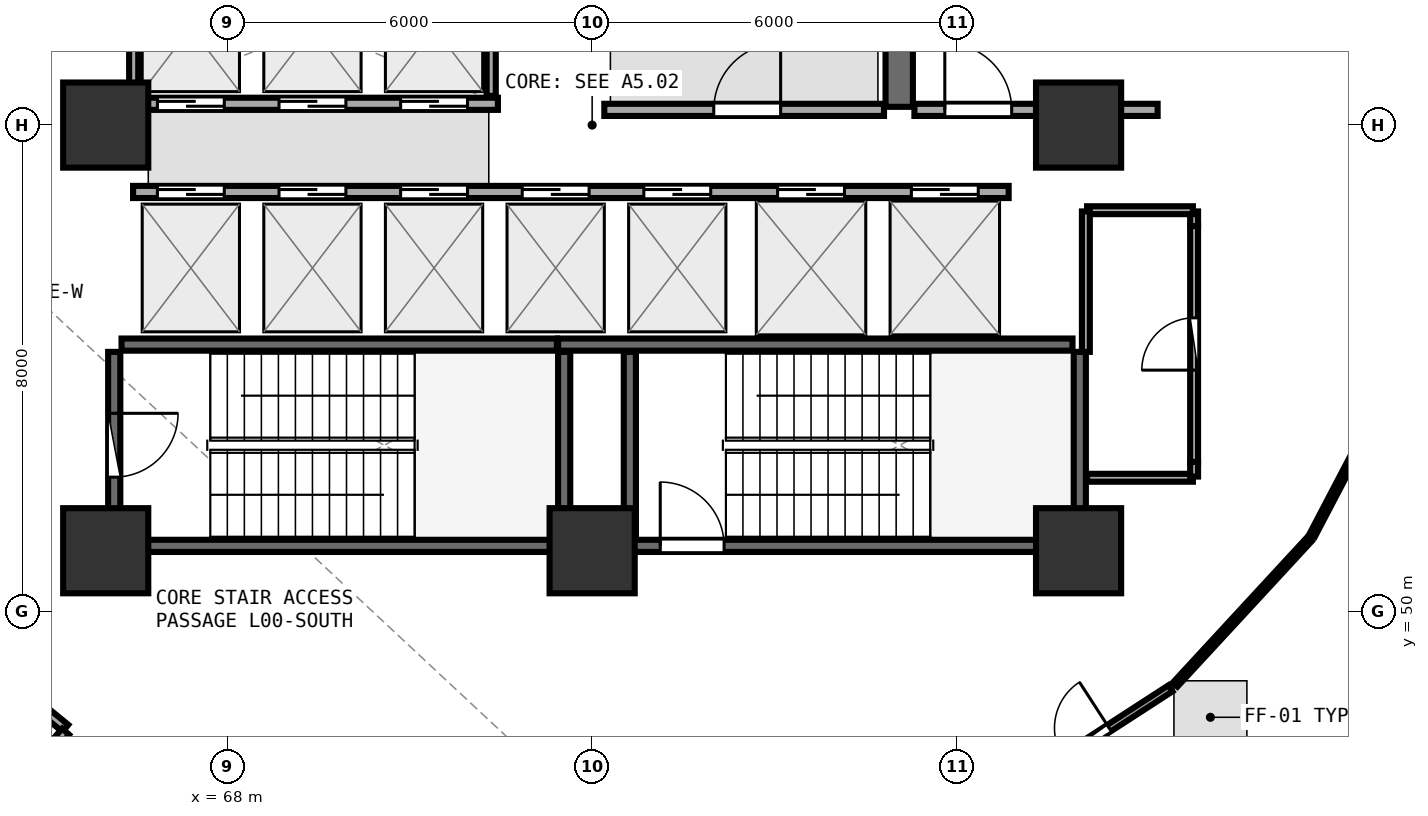
"""IFC4 building model, lengths in metres.
Left out: names, types, materials, properties, quantities, classifications, styles, units other than length and angle.
Written with IfcOpenShell. Run it as: python <this file> out.ifc"""

import sys

from ifc_helpers import new_model, si_unit, direction, frame, frame_2d, origin, origin_2d, place, context, subcontext, project, spatial, rectangle, extrude, element, fill, save


model = new_model("IFC4")
c1 = context("Model", 3, precision=1e-05, world=origin(), true_north=direction((0.0, 1.0)))
c2 = subcontext(c1, "Body", "Model", "MODEL_VIEW")
j1 = project(units=[si_unit("LENGTHUNIT", "METRE"), si_unit("PLANEANGLEUNIT", "RADIAN")], contexts=[c1])
p1 = place(None, origin())
s1 = spatial("IfcSite", under=j1, at=p1, CompositionType="ELEMENT")
p2 = place(p1, origin())
s2 = spatial("IfcBuilding", under=s1, at=p2, CompositionType="ELEMENT")
p3 = place(p2, origin())
s3 = spatial("IfcBuildingStorey", under=s2, at=p3, CompositionType="ELEMENT", Elevation=0.0)
for number, where, z_axis, x_axis in (
    (1, (66.0, 51.0, 0.0), (0.0, 0.0, 1.0), (1.0, 0.0, 0.0)),
    (2, (74.0, 51.0, 0.0), (0.0, 0.0, 1.0), (1.0, 0.0, 0.0)),
    (3, (82.0, 51.0, 0.0), (0.0, 0.0, 1.0), (1.0, 0.0, 0.0)),
    (4, (82.0, 58.0, 0.0), (0.0, 0.0, 1.0), (1.0, 0.0, 0.0)),
    (5, (66.0, 58.0, 0.0), (0.0, 0.0, 1.0), (1.0, 0.0, 0.0)),
):
    element("IfcColumn", number, at=place(p3, frame(where, z_axis=z_axis, x_axis=x_axis)), inside=s3, PredefinedType="PILASTER", context=c2, shape_type="SweptSolid", body=[
        extrude(rectangle(XDim=1.4, YDim=1.4, at=origin_2d()), origin(), (0.0, 0.0, 1.0), 4.5),
    ])
p4 = place(p3, frame((74.0, 51.08, 0.0), z_axis=(0.0, 0.0, 1.0), x_axis=(1.0, 0.0, 0.0)))
e6 = element("IfcWall", 6, at=p4, inside=s3, PredefinedType="SHEAR", context=c2, shape_type="SweptSolid", body=[
    extrude(rectangle(XDim=7.9, YDim=0.2, at=frame_2d((3.95, 0.0))), origin(), (0.0, 0.0, 1.0), 4.2),
])
p5 = place(p4, frame((1.12, 0.0, 0.0)))
e7 = element("IfcOpeningElement", 7, at=p5, cuts=e6, PredefinedType="OPENING", context=c2, shape_type="SweptSolid", body=[
    extrude(rectangle(XDim=1.05, YDim=2.1, at=frame_2d((0.525, 1.05))), frame((0.0, 0.11, 0.0), z_axis=(0.0, -1.0, 0.0), x_axis=(1.0, 0.0, 0.0)), (0.0, 0.0, 1.0), 0.22),
])
p6 = place(p3, frame((82.02, 51.2, 0.0), z_axis=(0.0, 0.0, 1.0), x_axis=(0.0, 1.0, 0.0)))
e8 = element("IfcWall", 8, at=p6, inside=s3, PredefinedType="SHEAR", context=c2, shape_type="SweptSolid", body=[
    extrude(rectangle(XDim=3.07, YDim=0.2, at=frame_2d((1.535, 0.0))), origin(), (0.0, 0.0, 1.0), 4.2),
])
p7 = place(p3, frame((81.9, 54.39, 0.0), z_axis=(0.0, 0.0, 1.0), x_axis=(-1.0, 0.0, 0.0)))
e9 = element("IfcWall", 9, at=p7, inside=s3, PredefinedType="SHEAR", context=c2, shape_type="SweptSolid", body=[
    extrude(rectangle(XDim=8.46, YDim=0.2, at=frame_2d((4.23, 0.0))), origin(), (0.0, 0.0, 1.0), 4.2),
])
p8 = place(p3, frame((74.62, 54.27, 0.0), z_axis=(0.0, 0.0, 1.0), x_axis=(0.0, -1.0, 0.0)))
e10 = element("IfcWall", 10, at=p8, inside=s3, PredefinedType="SHEAR", context=c2, shape_type="SweptSolid", body=[
    extrude(rectangle(XDim=3.07, YDim=0.2, at=frame_2d((1.535, 0.0))), origin(), (0.0, 0.0, 1.0), 4.2),
])
p9 = place(p3, frame((66.26, 51.08, 0.0), z_axis=(0.0, 0.0, 1.0), x_axis=(1.0, 0.0, 0.0)))
e11 = element("IfcWall", 11, at=p9, inside=s3, PredefinedType="SHEAR", context=c2, shape_type="SweptSolid", body=[
    extrude(rectangle(XDim=7.16, YDim=0.2, at=frame_2d((3.58, 0.0))), origin(), (0.0, 0.0, 1.0), 4.2),
])
p10 = place(p3, frame((73.54, 51.2, 0.0), z_axis=(0.0, 0.0, 1.0), x_axis=(0.0, 1.0, 0.0)))
e12 = element("IfcWall", 12, at=p10, inside=s3, PredefinedType="SHEAR", context=c2, shape_type="SweptSolid", body=[
    extrude(rectangle(XDim=3.07, YDim=0.2, at=frame_2d((1.535, 0.0))), origin(), (0.0, 0.0, 1.0), 4.2),
])
p11 = place(p3, frame((73.42, 54.39, 0.0), z_axis=(0.0, 0.0, 1.0), x_axis=(-1.0, 0.0, 0.0)))
e13 = element("IfcWall", 13, at=p11, inside=s3, PredefinedType="SHEAR", context=c2, shape_type="SweptSolid", body=[
    extrude(rectangle(XDim=7.16, YDim=0.2, at=frame_2d((3.58, 0.0))), origin(), (0.0, 0.0, 1.0), 4.2),
])
p12 = place(p3, frame((66.14, 54.27, 0.0), z_axis=(0.0, 0.0, 1.0), x_axis=(0.0, -1.0, 0.0)))
e14 = element("IfcWall", 14, at=p12, inside=s3, PredefinedType="SHEAR", context=c2, shape_type="SweptSolid", body=[
    extrude(rectangle(XDim=3.07, YDim=0.2, at=frame_2d((1.535, 0.0))), origin(), (0.0, 0.0, 1.0), 4.2),
])
p13 = place(p12, frame((1.01, 0.0, 0.0)))
e15 = element("IfcOpeningElement", 15, at=p13, cuts=e14, PredefinedType="OPENING", context=c2, shape_type="SweptSolid", body=[
    extrude(rectangle(XDim=1.05, YDim=2.1, at=frame_2d((0.525, 1.05))), frame((0.0, 0.11, 0.0), z_axis=(0.0, -1.0, 0.0), x_axis=(1.0, 0.0, 0.0)), (0.0, 0.0, 1.0), 0.22),
])
p14 = place(p3, frame((79.05, 58.3, 0.0), z_axis=(0.0, 0.0, 1.0), x_axis=(0.0, 1.0, 0.0)))
e16 = element("IfcWall", 16, at=p14, inside=s3, PredefinedType="SHEAR", context=c2, shape_type="SweptSolid", body=[
    extrude(rectangle(XDim=6.3, YDim=0.45, at=frame_2d((3.15, 0.0))), origin(), (0.0, 0.0, 1.0), 4.2),
])
p15 = place(p3, frame((74.2, 58.25, 0.0), z_axis=(0.0, 0.0, 1.0), x_axis=(1.0, 0.0, 0.0)))
e17 = element("IfcWall", 17, at=p15, inside=s3, PredefinedType="SOLIDWALL", context=c2, shape_type="SweptSolid", body=[
    extrude(rectangle(XDim=4.6, YDim=0.2, at=frame_2d((2.3, 0.0))), origin(), (0.0, 0.0, 1.0), 4.19),
])
p16 = place(p15, frame((1.8, 0.0, 0.0)))
e18 = element("IfcOpeningElement", 18, at=p16, cuts=e17, PredefinedType="OPENING", context=c2, shape_type="SweptSolid", body=[
    extrude(rectangle(XDim=1.1, YDim=2.1, at=frame_2d((0.55, 1.05))), frame((0.0, 0.11, 0.0), z_axis=(0.0, -1.0, 0.0), x_axis=(1.0, 0.0, 0.0)), (0.0, 0.0, 1.0), 0.22),
])
p17 = place(p3, frame((79.3, 58.25, 0.0), z_axis=(0.0, 0.0, 1.0), x_axis=(1.0, 0.0, 0.0)))
e19 = element("IfcWall", 19, at=p17, inside=s3, PredefinedType="SOLIDWALL", context=c2, shape_type="SweptSolid", body=[
    extrude(rectangle(XDim=4.0, YDim=0.2, at=frame_2d((2.0, 0.0))), origin(), (0.0, 0.0, 1.0), 3.485),
])
p18 = place(p17, frame((0.5, 0.0, 0.0)))
e20 = element("IfcOpeningElement", 20, at=p18, cuts=e19, PredefinedType="OPENING", context=c2, shape_type="SweptSolid", body=[
    extrude(rectangle(XDim=1.1, YDim=2.1, at=frame_2d((0.55, 1.05))), frame((0.0, 0.11, 0.0), z_axis=(0.0, -1.0, 0.0), x_axis=(1.0, 0.0, 0.0)), (0.0, 0.0, 1.0), 0.22),
])
p19 = place(p3, frame((66.45, 58.35, 0.0), z_axis=(0.0, 0.0, 1.0), x_axis=(1.0, 0.0, 0.0)))
e21 = element("IfcWall", 21, at=p19, inside=s3, PredefinedType="SOLIDWALL", context=c2, shape_type="SweptSolid", body=[
    extrude(rectangle(XDim=6.0, YDim=0.2, at=frame_2d((3.0, 0.0))), origin(), (0.0, 0.0, 1.0), 4.19),
])
p20 = place(p19, frame((0.4, 0.0, 0.0)))
e22 = element("IfcOpeningElement", 22, at=p20, cuts=e21, PredefinedType="OPENING", context=c2, shape_type="SweptSolid", body=[
    extrude(rectangle(XDim=1.1, YDim=2.1, at=frame_2d((0.55, 1.05))), frame((0.0, 0.11, 0.0), z_axis=(0.0, -1.0, 0.0), x_axis=(1.0, 0.0, 0.0)), (0.0, 0.0, 1.0), 0.22),
])
p21 = place(p19, frame((2.4, 0.0, 0.0)))
e23 = element("IfcOpeningElement", 23, at=p21, cuts=e21, PredefinedType="OPENING", context=c2, shape_type="SweptSolid", body=[
    extrude(rectangle(XDim=1.1, YDim=2.1, at=frame_2d((0.55, 1.05))), frame((0.0, 0.11, 0.0), z_axis=(0.0, -1.0, 0.0), x_axis=(1.0, 0.0, 0.0)), (0.0, 0.0, 1.0), 0.22),
])
p22 = place(p19, frame((4.4, 0.0, 0.0)))
e24 = element("IfcOpeningElement", 24, at=p22, cuts=e21, PredefinedType="OPENING", context=c2, shape_type="SweptSolid", body=[
    extrude(rectangle(XDim=1.1, YDim=2.1, at=frame_2d((0.55, 1.05))), frame((0.0, 0.11, 0.0), z_axis=(0.0, -1.0, 0.0), x_axis=(1.0, 0.0, 0.0)), (0.0, 0.0, 1.0), 0.22),
])
for number, where, z_axis, x_axis in (
    (25, (66.46, 58.48, 0.0), (0.0, 0.0, 1.0), (0.0, 1.0, 0.0)),
    (26, (72.34, 58.48, 0.0), (0.0, 0.0, 1.0), (0.0, 1.0, 0.0)),
):
    element("IfcWall", number, at=place(p3, frame(where, z_axis=z_axis, x_axis=x_axis)), inside=s3, PredefinedType="PARTITIONING", context=c2, shape_type="SweptSolid", body=[
        extrude(rectangle(XDim=2.46, YDim=0.15, at=frame_2d((1.23, 0.0))), origin(), (0.0, 0.0, 1.0), 4.19),
    ])
p23 = place(p3, frame((66.45, 56.9, 0.0), z_axis=(0.0, 0.0, 1.0), x_axis=(1.0, 0.0, 0.0)))
e27 = element("IfcWall", 27, at=p23, inside=s3, PredefinedType="SOLIDWALL", context=c2, shape_type="SweptSolid", body=[
    extrude(rectangle(XDim=14.4, YDim=0.2, at=frame_2d((7.2, 0.0))), origin(), (0.0, 0.0, 1.0), 4.19),
])
p24 = place(p23, frame((0.4, 0.0, 0.0)))
e28 = element("IfcOpeningElement", 28, at=p24, cuts=e27, PredefinedType="OPENING", context=c2, shape_type="SweptSolid", body=[
    extrude(rectangle(XDim=1.1, YDim=2.1, at=frame_2d((0.55, 1.05))), frame((0.0, 0.11, 0.0), z_axis=(0.0, -1.0, 0.0), x_axis=(1.0, 0.0, 0.0)), (0.0, 0.0, 1.0), 0.22),
])
p25 = place(p23, frame((2.4, 0.0, 0.0)))
e29 = element("IfcOpeningElement", 29, at=p25, cuts=e27, PredefinedType="OPENING", context=c2, shape_type="SweptSolid", body=[
    extrude(rectangle(XDim=1.1, YDim=2.1, at=frame_2d((0.55, 1.05))), frame((0.0, 0.11, 0.0), z_axis=(0.0, -1.0, 0.0), x_axis=(1.0, 0.0, 0.0)), (0.0, 0.0, 1.0), 0.22),
])
p26 = place(p23, frame((4.4, 0.0, 0.0)))
e30 = element("IfcOpeningElement", 30, at=p26, cuts=e27, PredefinedType="OPENING", context=c2, shape_type="SweptSolid", body=[
    extrude(rectangle(XDim=1.1, YDim=2.1, at=frame_2d((0.55, 1.05))), frame((0.0, 0.11, 0.0), z_axis=(0.0, -1.0, 0.0), x_axis=(1.0, 0.0, 0.0)), (0.0, 0.0, 1.0), 0.22),
])
p27 = place(p23, frame((6.4, 0.0, 0.0)))
e31 = element("IfcOpeningElement", 31, at=p27, cuts=e27, PredefinedType="OPENING", context=c2, shape_type="SweptSolid", body=[
    extrude(rectangle(XDim=1.1, YDim=2.1, at=frame_2d((0.55, 1.05))), frame((0.0, 0.11, 0.0), z_axis=(0.0, -1.0, 0.0), x_axis=(1.0, 0.0, 0.0)), (0.0, 0.0, 1.0), 0.22),
])
p28 = place(p23, frame((8.4, 0.0, 0.0)))
e32 = element("IfcOpeningElement", 32, at=p28, cuts=e27, PredefinedType="OPENING", context=c2, shape_type="SweptSolid", body=[
    extrude(rectangle(XDim=1.1, YDim=2.1, at=frame_2d((0.55, 1.05))), frame((0.0, 0.11, 0.0), z_axis=(0.0, -1.0, 0.0), x_axis=(1.0, 0.0, 0.0)), (0.0, 0.0, 1.0), 0.22),
])
p29 = place(p23, frame((10.6, 0.0, 0.0)))
e33 = element("IfcOpeningElement", 33, at=p29, cuts=e27, PredefinedType="OPENING", context=c2, shape_type="SweptSolid", body=[
    extrude(rectangle(XDim=1.1, YDim=2.1, at=frame_2d((0.55, 1.05))), frame((0.0, 0.11, 0.0), z_axis=(0.0, -1.0, 0.0), x_axis=(1.0, 0.0, 0.0)), (0.0, 0.0, 1.0), 0.22),
])
p30 = place(p23, frame((12.8, 0.0, 0.0)))
e34 = element("IfcOpeningElement", 34, at=p30, cuts=e27, PredefinedType="OPENING", context=c2, shape_type="SweptSolid", body=[
    extrude(rectangle(XDim=1.1, YDim=2.1, at=frame_2d((0.55, 1.05))), frame((0.0, 0.11, 0.0), z_axis=(0.0, -1.0, 0.0), x_axis=(1.0, 0.0, 0.0)), (0.0, 0.0, 1.0), 0.22),
])
p31 = place(p3, frame((83.9, 52.46, 0.0), z_axis=(0.0, 0.0, 1.0), x_axis=(0.0, 1.0, 0.0)))
e35 = element("IfcWall", 35, at=p31, inside=s3, PredefinedType="PLUMBINGWALL", context=c2, shape_type="SweptSolid", body=[
    extrude(rectangle(XDim=3.88, YDim=0.13, at=frame_2d((1.94, 0.0))), origin(), (0.0, 0.0, 1.0), 4.19),
])
p32 = place(p31, frame((1.51, 0.0, 0.0)))
e36 = element("IfcOpeningElement", 36, at=p32, cuts=e35, PredefinedType="OPENING", context=c2, shape_type="SweptSolid", body=[
    extrude(rectangle(XDim=0.86, YDim=2.05, at=frame_2d((0.43, 1.025))), frame((0.0, 0.075, 0.0), z_axis=(0.0, -1.0, 0.0), x_axis=(1.0, 0.0, 0.0)), (0.0, 0.0, 1.0), 0.15),
])
p33 = place(p3, frame((80.74, 46.942, 0.0), z_axis=(0.0, 0.0, 1.0), x_axis=(0.839224842152, 0.543784575282, 0.0)))
e37 = element("IfcWall", 37, at=p33, inside=s3, PredefinedType="PARTITIONING", context=c2, shape_type="SweptSolid", body=[
    extrude(rectangle(XDim=3.302, YDim=0.12, at=frame_2d((1.651, 0.0))), origin(), (0.0, 0.0, 1.0), 3.585),
])
p34 = place(p33, frame((1.201, 0.0, 0.0)))
e38 = element("IfcOpeningElement", 38, at=p34, cuts=e37, PredefinedType="OPENING", context=c2, shape_type="SweptSolid", body=[
    extrude(rectangle(XDim=0.9, YDim=2.08, at=frame_2d((0.45, 1.04))), frame((0.0, 0.07, 0.0), z_axis=(0.0, -1.0, 0.0), x_axis=(1.0, 0.0, 0.0)), (0.0, 0.0, 1.0), 0.14),
])
p35 = place(p3, frame((82.14, 52.2, 0.0), z_axis=(0.0, 0.0, 1.0), x_axis=(1.0, 0.0, 0.0)))
e39 = element("IfcWall", 39, at=p35, inside=s3, PredefinedType="PLUMBINGWALL", context=c2, shape_type="SweptSolid", body=[
    extrude(rectangle(XDim=1.74, YDim=0.13, at=frame_2d((0.87, 0.0))), origin(), (0.0, 0.0, 1.0), 3.485),
])
for number, where, z_axis, x_axis in (
    (40, (83.9, 52.22, 0.0), (0.0, 0.0, 1.0), (0.0, 1.0, 0.0)),
    (41, (83.9, 56.34, 0.0), (0.0, 0.0, 1.0), (0.0, 1.0, 0.0)),
):
    element("IfcWall", number, at=place(p3, frame(where, z_axis=z_axis, x_axis=x_axis)), inside=s3, PredefinedType="PLUMBINGWALL", context=c2, shape_type="SweptSolid", body=[
        extrude(rectangle(XDim=0.24, YDim=0.13, at=frame_2d((0.12, 0.0))), origin(), (0.0, 0.0, 1.0), 4.19),
    ])
p36 = place(p3, frame((83.88, 56.6, 0.0), z_axis=(0.0, 0.0, 1.0), x_axis=(-1.0, 0.0, 0.0)))
e42 = element("IfcWall", 42, at=p36, inside=s3, PredefinedType="PLUMBINGWALL", context=c2, shape_type="SweptSolid", body=[
    extrude(rectangle(XDim=1.74, YDim=0.13, at=frame_2d((0.87, 0.0))), origin(), (0.0, 0.0, 1.0), 3.485),
])
p37 = place(p3, frame((82.12, 56.58, 0.0), z_axis=(0.0, 0.0, 1.0), x_axis=(0.0, -1.0, 0.0)))
e43 = element("IfcWall", 43, at=p37, inside=s3, PredefinedType="PLUMBINGWALL", context=c2, shape_type="SweptSolid", body=[
    extrude(rectangle(XDim=2.31, YDim=0.13, at=frame_2d((1.155, 0.0))), origin(), (0.0, 0.0, 1.0), 3.485),
])
p38 = place(p3, frame((63.861, 49.288, 0.0), z_axis=(0.0, 0.0, 1.0), x_axis=(0.774014344512, -0.633168061805, 0.0)))
e44 = element("IfcWall", 44, at=p38, inside=s3, PredefinedType="PARTITIONING", context=c2, shape_type="SweptSolid", body=[
    extrude(rectangle(XDim=1.907, YDim=0.15, at=frame_2d((0.953, 0.0))), origin(), (0.0, 0.0, 1.0), 3.585),
])
p39 = place(p3, frame((65.341, 48.025, 0.0), z_axis=(0.0, 0.0, 1.0), x_axis=(-0.666165058958, -0.745804340443, 0.0)))
e45 = element("IfcWall", 45, at=p39, inside=s3, PredefinedType="PARTITIONING", context=c2, shape_type="SweptSolid", body=[
    extrude(rectangle(XDim=8.774, YDim=0.15, at=frame_2d((4.387, 0.0))), origin(), (0.0, 0.0, 1.0), 3.585),
])
p40 = place(p3, frame((83.589, 48.799, 0.0), z_axis=(0.0, 0.0, 1.0), x_axis=(0.678488862619, 0.734610688257, 0.0)))
e46 = element("IfcWall", 46, at=p40, inside=s3, PredefinedType="PARTITIONING", context=c2, shape_type="SweptSolid", body=[
    extrude(rectangle(XDim=3.254, YDim=0.1, at=frame_2d((1.627, 0.0))), origin(), (0.0, 0.0, 1.0), 3.585),
])
p41 = place(p3, frame((85.843, 51.254, 0.0), z_axis=(0.0, 0.0, 1.0), x_axis=(0.464213996316, 0.885723075021, 0.0)))
e47 = element("IfcWall", 47, at=p41, inside=s3, PredefinedType="PARTITIONING", context=c2, shape_type="SweptSolid", body=[
    extrude(rectangle(XDim=3.173, YDim=0.1, at=frame_2d((1.586, 0.0))), origin(), (0.0, 0.0, 1.0), 4.19),
])
p42 = place(p3, frame((88.985, 49.482, 0.0), z_axis=(0.0, 0.0, 1.0), x_axis=(-0.683655334271, -0.729805031446, 0.0)))
e48 = element("IfcWall", 48, at=p42, inside=s3, PredefinedType="PARTITIONING", context=c2, shape_type="SweptSolid", body=[
    extrude(rectangle(XDim=4.121, YDim=0.1, at=frame_2d((2.061, 0.0))), origin(), (0.0, 0.0, 1.0), 3.585),
])
p43 = place(p5, origin())
e49 = element("IfcDoor", 49, at=p43, inside=s3, OperationType="SINGLE_SWING_LEFT", PredefinedType="DOOR", context=c2, shape_type="SweptSolid", body=[
    extrude(rectangle(XDim=1.05, YDim=2.1, at=frame_2d((0.525, 1.05))), frame((0.0, 0.025, 0.0), z_axis=(0.0, -1.0, 0.0), x_axis=(1.0, 0.0, 0.0)), (0.0, 0.0, 1.0), 0.05),
])
fill(e7, e49)
p44 = place(p13, origin())
e50 = element("IfcDoor", 50, at=p44, inside=s3, OperationType="SINGLE_SWING_LEFT", PredefinedType="DOOR", context=c2, shape_type="SweptSolid", body=[
    extrude(rectangle(XDim=1.05, YDim=2.1, at=frame_2d((0.525, 1.05))), frame((0.0, 0.025, 0.0), z_axis=(0.0, -1.0, 0.0), x_axis=(1.0, 0.0, 0.0)), (0.0, 0.0, 1.0), 0.05),
])
fill(e15, e50)
p45 = place(p16, frame((1.1, 0.0, 0.0), z_axis=(0.0, 0.0, 1.0), x_axis=(-1.0, 0.0, 0.0)))
e51 = element("IfcDoor", 51, at=p45, inside=s3, OperationType="SINGLE_SWING_LEFT", PredefinedType="DOOR", context=c2, shape_type="SweptSolid", body=[
    extrude(rectangle(XDim=1.1, YDim=2.1, at=frame_2d((0.55, 1.05))), frame((0.0, 0.025, 0.0), z_axis=(0.0, -1.0, 0.0), x_axis=(1.0, 0.0, 0.0)), (0.0, 0.0, 1.0), 0.05),
])
fill(e18, e51)
p46 = place(p18, frame((1.1, 0.0, 0.0), z_axis=(0.0, 0.0, 1.0), x_axis=(-1.0, 0.0, 0.0)))
e52 = element("IfcDoor", 52, at=p46, inside=s3, OperationType="SINGLE_SWING_RIGHT", PredefinedType="DOOR", context=c2, shape_type="SweptSolid", body=[
    extrude(rectangle(XDim=1.1, YDim=2.1, at=frame_2d((0.55, 1.05))), frame((0.0, 0.025, 0.0), z_axis=(0.0, -1.0, 0.0), x_axis=(1.0, 0.0, 0.0)), (0.0, 0.0, 1.0), 0.05),
])
fill(e20, e52)
p47 = place(p20, origin())
e53 = element("IfcDoor", 53, at=p47, inside=s3, OperationType="DOUBLE_DOOR_SLIDING", PredefinedType="DOOR", context=c2, shape_type="SweptSolid", body=[
    extrude(rectangle(XDim=1.1, YDim=2.1, at=frame_2d((0.55, 1.05))), frame((0.0, 0.025, 0.0), z_axis=(0.0, -1.0, 0.0), x_axis=(1.0, 0.0, 0.0)), (0.0, 0.0, 1.0), 0.05),
])
fill(e22, e53)
p48 = place(p21, origin())
e54 = element("IfcDoor", 54, at=p48, inside=s3, OperationType="DOUBLE_DOOR_SLIDING", PredefinedType="DOOR", context=c2, shape_type="SweptSolid", body=[
    extrude(rectangle(XDim=1.1, YDim=2.1, at=frame_2d((0.55, 1.05))), frame((0.0, 0.025, 0.0), z_axis=(0.0, -1.0, 0.0), x_axis=(1.0, 0.0, 0.0)), (0.0, 0.0, 1.0), 0.05),
])
fill(e23, e54)
p49 = place(p22, origin())
e55 = element("IfcDoor", 55, at=p49, inside=s3, OperationType="DOUBLE_DOOR_SLIDING", PredefinedType="DOOR", context=c2, shape_type="SweptSolid", body=[
    extrude(rectangle(XDim=1.1, YDim=2.1, at=frame_2d((0.55, 1.05))), frame((0.0, 0.025, 0.0), z_axis=(0.0, -1.0, 0.0), x_axis=(1.0, 0.0, 0.0)), (0.0, 0.0, 1.0), 0.05),
])
fill(e24, e55)
p50 = place(p24, origin())
e56 = element("IfcDoor", 56, at=p50, inside=s3, OperationType="DOUBLE_DOOR_SLIDING", PredefinedType="DOOR", context=c2, shape_type="SweptSolid", body=[
    extrude(rectangle(XDim=1.1, YDim=2.1, at=frame_2d((0.55, 1.05))), frame((0.0, 0.025, 0.0), z_axis=(0.0, -1.0, 0.0), x_axis=(1.0, 0.0, 0.0)), (0.0, 0.0, 1.0), 0.05),
])
fill(e28, e56)
p51 = place(p25, origin())
e57 = element("IfcDoor", 57, at=p51, inside=s3, OperationType="DOUBLE_DOOR_SLIDING", PredefinedType="DOOR", context=c2, shape_type="SweptSolid", body=[
    extrude(rectangle(XDim=1.1, YDim=2.1, at=frame_2d((0.55, 1.05))), frame((0.0, 0.025, 0.0), z_axis=(0.0, -1.0, 0.0), x_axis=(1.0, 0.0, 0.0)), (0.0, 0.0, 1.0), 0.05),
])
fill(e29, e57)
p52 = place(p26, origin())
e58 = element("IfcDoor", 58, at=p52, inside=s3, OperationType="DOUBLE_DOOR_SLIDING", PredefinedType="DOOR", context=c2, shape_type="SweptSolid", body=[
    extrude(rectangle(XDim=1.1, YDim=2.1, at=frame_2d((0.55, 1.05))), frame((0.0, 0.025, 0.0), z_axis=(0.0, -1.0, 0.0), x_axis=(1.0, 0.0, 0.0)), (0.0, 0.0, 1.0), 0.05),
])
fill(e30, e58)
p53 = place(p27, origin())
e59 = element("IfcDoor", 59, at=p53, inside=s3, OperationType="DOUBLE_DOOR_SLIDING", PredefinedType="DOOR", context=c2, shape_type="SweptSolid", body=[
    extrude(rectangle(XDim=1.1, YDim=2.1, at=frame_2d((0.55, 1.05))), frame((0.0, 0.025, 0.0), z_axis=(0.0, -1.0, 0.0), x_axis=(1.0, 0.0, 0.0)), (0.0, 0.0, 1.0), 0.05),
])
fill(e31, e59)
p54 = place(p28, origin())
e60 = element("IfcDoor", 60, at=p54, inside=s3, OperationType="DOUBLE_DOOR_SLIDING", PredefinedType="DOOR", context=c2, shape_type="SweptSolid", body=[
    extrude(rectangle(XDim=1.1, YDim=2.1, at=frame_2d((0.55, 1.05))), frame((0.0, 0.025, 0.0), z_axis=(0.0, -1.0, 0.0), x_axis=(1.0, 0.0, 0.0)), (0.0, 0.0, 1.0), 0.05),
])
fill(e32, e60)
p55 = place(p29, origin())
e61 = element("IfcDoor", 61, at=p55, inside=s3, OperationType="DOUBLE_DOOR_SLIDING", PredefinedType="DOOR", context=c2, shape_type="SweptSolid", body=[
    extrude(rectangle(XDim=1.1, YDim=2.1, at=frame_2d((0.55, 1.05))), frame((0.0, 0.025, 0.0), z_axis=(0.0, -1.0, 0.0), x_axis=(1.0, 0.0, 0.0)), (0.0, 0.0, 1.0), 0.05),
])
fill(e33, e61)
p56 = place(p30, origin())
e62 = element("IfcDoor", 62, at=p56, inside=s3, OperationType="DOUBLE_DOOR_SLIDING", PredefinedType="DOOR", context=c2, shape_type="SweptSolid", body=[
    extrude(rectangle(XDim=1.1, YDim=2.1, at=frame_2d((0.55, 1.05))), frame((0.0, 0.025, 0.0), z_axis=(0.0, -1.0, 0.0), x_axis=(1.0, 0.0, 0.0)), (0.0, 0.0, 1.0), 0.05),
])
fill(e34, e62)
p57 = place(p32, origin())
e63 = element("IfcDoor", 63, at=p57, inside=s3, OperationType="SINGLE_SWING_LEFT", PredefinedType="DOOR", context=c2, shape_type="SweptSolid", body=[
    extrude(rectangle(XDim=0.86, YDim=2.05, at=frame_2d((0.43, 1.025))), frame((0.0, 0.025, 0.0), z_axis=(0.0, -1.0, 0.0), x_axis=(1.0, 0.0, 0.0)), (0.0, 0.0, 1.0), 0.05),
])
fill(e36, e63)
p58 = place(p34, origin())
e64 = element("IfcDoor", 64, at=p58, inside=s3, OperationType="SINGLE_SWING_RIGHT", PredefinedType="DOOR", context=c2, shape_type="SweptSolid", body=[
    extrude(rectangle(XDim=0.9, YDim=2.08, at=frame_2d((0.45, 1.04))), frame((0.0, 0.025, 0.0), z_axis=(0.0, -1.0, 0.0), x_axis=(1.0, 0.0, 0.0)), (0.0, 0.0, 1.0), 0.05),
])
fill(e38, e64)
save(model, sys.argv[1])
